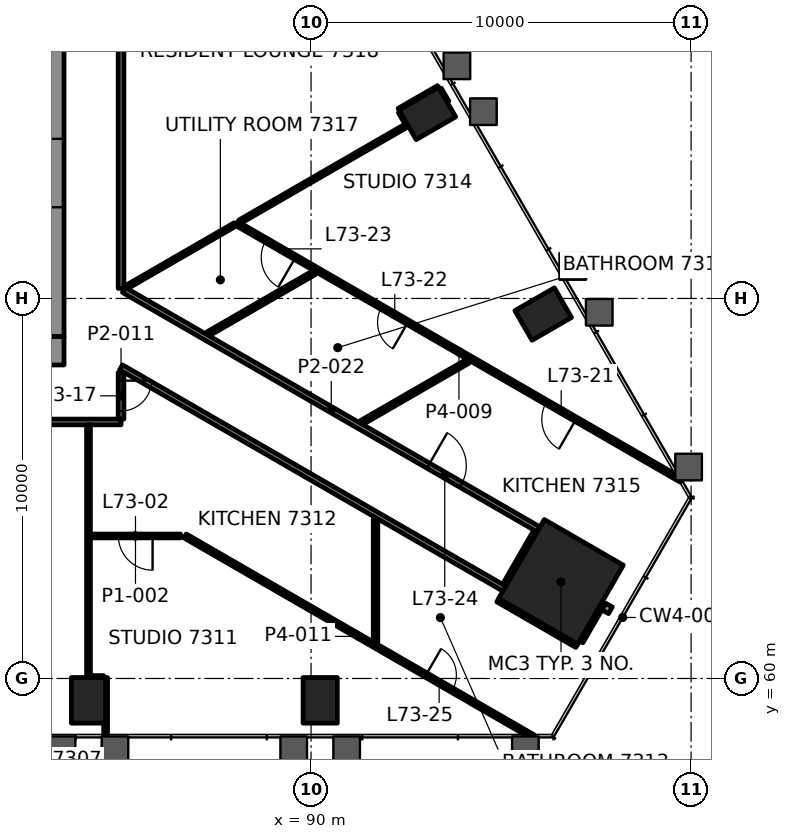
"""IFC4 building model, lengths in metres.
Left out: names, types, materials, properties, quantities, classifications, styles, units other than length and angle.
Written with IfcOpenShell. Run it as: python <this file> out.ifc"""

import sys

from ifc_helpers import new_model, si_unit, direction, frame, frame_2d, origin, origin_2d, place, context, subcontext, project, spatial, rectangle, hollow_rectangle, extrude, element, fill, save


model = new_model("IFC4")
c1 = context("Model", 3, precision=1e-05, world=origin(), true_north=direction((0.0, 1.0)))
c2 = subcontext(c1, "Body", "Model", "MODEL_VIEW")
j1 = project(units=[si_unit("LENGTHUNIT", "METRE"), si_unit("PLANEANGLEUNIT", "RADIAN")], contexts=[c1])
p1 = place(None, origin())
s1 = spatial("IfcSite", under=j1, at=p1, CompositionType="ELEMENT")
p2 = place(p1, origin())
s2 = spatial("IfcBuilding", under=s1, at=p2, CompositionType="ELEMENT")
p3 = place(p2, frame((0.0, 0.0, 302.1)))
s3 = spatial("IfcBuildingStorey", under=s2, at=p3, CompositionType="ELEMENT", Elevation=302.1)
p4 = place(p3, frame((96.577, 62.542, 0.0), z_axis=(0.0, 0.0, 1.0), x_axis=(0.5, 0.866025403784, 0.0)))
e1 = element("IfcColumn", 1, at=p4, inside=s3, PredefinedType="COLUMN", context=c2, shape_type="SweptSolid", body=[
    extrude(rectangle(XDim=2.4, YDim=2.4, at=origin_2d()), origin(), (0.0, 0.0, 1.0), 3.5),
])
for number, where, z_axis, x_axis in (
    (2, (84.144, 59.425, -0.0), (0.0, 0.0, 1.0), (1.0, 0.0, 0.0)),
    (3, (90.24, 59.425, -0.0), (0.0, 0.0, 1.0), (1.0, 0.0, 0.0)),
    (4, (96.109, 69.589, -0.0), (0.0, 0.0, 1.0), (-0.5, 0.866, 0.0)),
    (5, (93.061, 74.869, -0.0), (0.0, 0.0, 1.0), (-0.5, 0.866, 0.0)),
):
    element("IfcColumn", number, at=place(p3, frame(where, z_axis=z_axis, x_axis=x_axis)), inside=s3, PredefinedType="COLUMN", context=c2, shape_type="SweptSolid", body=[
        extrude(hollow_rectangle(XDim=0.9, YDim=1.2, WallThickness=0.06, at=origin_2d()), origin(), (0.0, 0.0, 1.0), 3.5),
    ])
p5 = place(p3, frame((66.5, 68.625, 0.0), z_axis=(0.0, 0.0, 1.0), x_axis=(1.0, 0.0, 0.0)))
e6 = element("IfcWall", 6, at=p5, inside=s3, PredefinedType="SHEAR", context=c2, shape_type="SweptSolid", body=[
    extrude(rectangle(XDim=17.0, YDim=0.75, at=frame_2d((8.5, 0.0))), origin(), (0.0, 0.0, 1.0), 3.3),
])
p6 = place(p5, frame((2.7, 0.0, 0.0)))
e7 = element("IfcOpeningElement", 7, at=p6, cuts=e6, PredefinedType="OPENING", context=c2, shape_type="SweptSolid", body=[
    extrude(rectangle(XDim=0.9, YDim=2.1, at=frame_2d((0.45, 1.05))), frame((0.0, 0.385, 0.0), z_axis=(0.0, -1.0, 0.0), x_axis=(1.0, 0.0, 0.0)), (0.0, 0.0, 1.0), 0.77),
])
p7 = place(p3, frame((83.125, 69.0, 0.0), z_axis=(0.0, 0.0, 1.0), x_axis=(0.0, 1.0, 0.0)))
e8 = element("IfcWall", 8, at=p7, inside=s3, PredefinedType="SHEAR", context=c2, shape_type="SweptSolid", body=[
    extrude(rectangle(XDim=12.0, YDim=0.75, at=frame_2d((6.0, 0.0))), origin(), (0.0, 0.0, 1.0), 3.3),
])
p8 = place(p7, frame((3.4, 0.0, 0.0)))
e9 = element("IfcOpeningElement", 9, at=p8, cuts=e8, PredefinedType="OPENING", context=c2, shape_type="SweptSolid", body=[
    extrude(rectangle(XDim=1.8, YDim=2.1, at=frame_2d((0.9, 1.05))), frame((0.0, 0.385, 0.0), z_axis=(0.0, -1.0, 0.0), x_axis=(1.0, 0.0, 0.0)), (0.0, 0.0, 1.0), 0.77),
])
p9 = place(p3, frame((84.194, 60.025, 0.0), z_axis=(0.0, 0.0, 1.0), x_axis=(1.0, 0.0, 0.0)))
e10 = element("IfcWall", 10, at=p9, inside=s3, PredefinedType="PARTITIONING", context=c2, shape_type="SweptSolid", body=[
    extrude(rectangle(XDim=0.347, YDim=0.1, at=frame_2d((0.173, 0.0))), origin(), (0.0, 0.0, 1.0), 2.7),
])
p10 = place(p3, frame((86.566, 63.75, 0.0), z_axis=(0.0, 0.0, 1.0), x_axis=(-1.0, 0.0, 0.0)))
e11 = element("IfcWall", 11, at=p10, inside=s3, PredefinedType="PARTITIONING", context=c2, shape_type="SweptSolid", body=[
    extrude(rectangle(XDim=2.372, YDim=0.1, at=frame_2d((1.186, 0.0))), origin(), (0.0, 0.0, 1.0), 2.7),
])
p11 = place(p10, frame((0.736, 0.0, 0.0)))
e12 = element("IfcOpeningElement", 12, at=p11, cuts=e11, PredefinedType="OPENING", context=c2, shape_type="SweptSolid", body=[
    extrude(rectangle(XDim=0.9, YDim=2.1, at=frame_2d((0.45, 1.05))), frame((0.0, 0.06, 0.0), z_axis=(0.0, -1.0, 0.0), x_axis=(1.0, 0.0, 0.0)), (0.0, 0.0, 1.0), 0.12),
])
p12 = place(p3, frame((85.0, 66.75, 0.0), z_axis=(0.0, 0.0, 1.0), x_axis=(-1.0, 0.0, 0.0)))
e13 = element("IfcWall", 13, at=p12, inside=s3, PredefinedType="PARTITIONING", context=c2, shape_type="SweptSolid", body=[
    extrude(rectangle(XDim=20.0, YDim=0.15, at=frame_2d((10.0, 0.0))), origin(), (0.0, 0.0, 1.0), 2.7),
])
p13 = place(p12, frame((5.486, 0.0, 0.0)))
e14 = element("IfcOpeningElement", 14, at=p13, cuts=e13, PredefinedType="OPENING", context=c2, shape_type="SweptSolid", body=[
    extrude(rectangle(XDim=0.9, YDim=2.1, at=frame_2d((0.45, 1.05))), frame((0.0, 0.085, 0.0), z_axis=(0.0, -1.0, 0.0), x_axis=(1.0, 0.0, 0.0)), (0.0, 0.0, 1.0), 0.17),
])
p14 = place(p12, frame((11.582, 0.0, 0.0)))
e15 = element("IfcOpeningElement", 15, at=p14, cuts=e13, PredefinedType="OPENING", context=c2, shape_type="SweptSolid", body=[
    extrude(rectangle(XDim=0.9, YDim=2.1, at=frame_2d((0.45, 1.05))), frame((0.0, 0.085, 0.0), z_axis=(0.0, -1.0, 0.0), x_axis=(1.0, 0.0, 0.0)), (0.0, 0.0, 1.0), 0.17),
])
p15 = place(p12, frame((13.614, 0.0, 0.0)))
e16 = element("IfcOpeningElement", 16, at=p15, cuts=e13, PredefinedType="OPENING", context=c2, shape_type="SweptSolid", body=[
    extrude(rectangle(XDim=0.9, YDim=2.1, at=frame_2d((0.45, 1.05))), frame((0.0, 0.085, 0.0), z_axis=(0.0, -1.0, 0.0), x_axis=(1.0, 0.0, 0.0)), (0.0, 0.0, 1.0), 0.17),
])
p16 = place(p12, frame((15.646, 0.0, 0.0)))
e17 = element("IfcOpeningElement", 17, at=p16, cuts=e13, PredefinedType="OPENING", context=c2, shape_type="SweptSolid", body=[
    extrude(rectangle(XDim=0.9, YDim=2.1, at=frame_2d((0.45, 1.05))), frame((0.0, 0.085, 0.0), z_axis=(0.0, -1.0, 0.0), x_axis=(1.0, 0.0, 0.0)), (0.0, 0.0, 1.0), 0.17),
])
p17 = place(p12, frame((17.678, 0.0, 0.0)))
e18 = element("IfcOpeningElement", 18, at=p17, cuts=e13, PredefinedType="OPENING", context=c2, shape_type="SweptSolid", body=[
    extrude(rectangle(XDim=0.9, YDim=2.1, at=frame_2d((0.45, 1.05))), frame((0.0, 0.085, 0.0), z_axis=(0.0, -1.0, 0.0), x_axis=(1.0, 0.0, 0.0)), (0.0, 0.0, 1.0), 0.17),
])
for number, where, z_axis, x_axis in (
    (19, (91.333, 66.736, 0.0), (0.0, 0.0, 1.0), (0.866, 0.5, 0.0)),
    (20, (87.292, 69.069, 0.0), (0.0, 0.0, 1.0), (0.866, 0.5, 0.0)),
):
    element("IfcWall", number, at=place(p3, frame(where, z_axis=z_axis, x_axis=x_axis)), inside=s3, PredefinedType="PARTITIONING", context=c2, shape_type="SweptSolid", body=[
        extrude(rectangle(XDim=3.228, YDim=0.12, at=frame_2d((1.614, 0.0))), origin(), (0.0, 0.0, 1.0), 2.7),
    ])
p18 = place(p3, frame((85.145, 70.299, 0.0), z_axis=(0.0, 0.0, 1.0), x_axis=(0.866032610133, 0.499987518031, 0.0)))
e21 = element("IfcWall", 21, at=p18, inside=s3, PredefinedType="PARTITIONING", context=c2, shape_type="SweptSolid", body=[
    extrude(rectangle(XDim=3.295, YDim=0.1, at=frame_2d((1.648, 0.0))), origin(), (0.0, 0.0, 1.0), 2.7),
])
p19 = place(p3, frame((92.318, 74.959, 0.0), z_axis=(0.0, 0.0, 1.0), x_axis=(0.866087020037, 0.499893262331, 0.0)))
e22 = element("IfcWall", 22, at=p19, inside=s3, PredefinedType="PARTITIONING", context=c2, shape_type="SweptSolid", body=[
    extrude(rectangle(XDim=1.196, YDim=0.1, at=frame_2d((0.598, 0.0))), origin(), (0.0, 0.0, 1.0), 2.688),
])
p20 = place(p3, frame((97.067, 60.99, 0.0), z_axis=(0.0, 0.0, 1.0), x_axis=(0.499818604933, 0.866130106949, 0.0)))
e23 = element("IfcWall", 23, at=p20, inside=s3, PredefinedType="PARTITIONING", context=c2, shape_type="SweptSolid", body=[
    extrude(rectangle(XDim=1.099, YDim=0.2, at=frame_2d((0.55, 0.0))), origin(), (0.0, 0.0, 1.0), 2.7),
])
p21 = place(p3, frame((95.128, 62.433, 0.0), z_axis=(0.0, 0.0, 1.0), x_axis=(0.500052415518, 0.865995139556, 0.0)))
e24 = element("IfcWall", 24, at=p21, inside=s3, PredefinedType="PARTITIONING", context=c2, shape_type="SweptSolid", body=[
    extrude(rectangle(XDim=1.644, YDim=0.2, at=frame_2d((0.822, 0.0))), origin(), (0.0, 0.0, 1.0), 2.547),
])
p22 = place(p3, frame((91.697, 60.966, 0.0), z_axis=(0.0, 0.0, 1.0), x_axis=(0.0, 1.0, 0.0)))
e25 = element("IfcWall", 25, at=p22, inside=s3, PredefinedType="PARTITIONING", context=c2, shape_type="SweptSolid", body=[
    extrude(rectangle(XDim=3.228, YDim=0.12, at=frame_2d((1.614, 0.0))), origin(), (0.0, 0.0, 1.0), 2.7),
])
p23 = place(p3, frame((85.0, 68.051, 0.0), z_axis=(0.0, 0.0, 1.0), x_axis=(0.0, -1.0, 0.0)))
e26 = element("IfcWall", 26, at=p23, inside=s3, PredefinedType="PARTITIONING", context=c2, shape_type="SweptSolid", body=[
    extrude(rectangle(XDim=1.226, YDim=0.15, at=frame_2d((0.613, 0.0))), origin(), (0.0, 0.0, 1.0), 2.547),
])
p24 = place(p23, frame((0.213, 0.0, 0.0)))
e27 = element("IfcOpeningElement", 27, at=p24, cuts=e26, PredefinedType="OPENING", context=c2, shape_type="SweptSolid", body=[
    extrude(rectangle(XDim=0.8, YDim=2.1, at=frame_2d((0.4, 1.05))), frame((0.0, 0.085, 0.0), z_axis=(0.0, -1.0, 0.0), x_axis=(1.0, 0.0, 0.0)), (0.0, 0.0, 1.0), 0.17),
])
p25 = place(p3, frame((85.0, 70.266, 0.0), z_axis=(0.0, 0.0, 1.0), x_axis=(0.0, 1.0, 0.0)))
e28 = element("IfcWall", 28, at=p25, inside=s3, PredefinedType="PARTITIONING", context=c2, shape_type="SweptSolid", body=[
    extrude(rectangle(XDim=12.982, YDim=0.15, at=frame_2d((6.491, 0.0))), origin(), (0.0, 0.0, 1.0), 2.7),
])
p26 = place(p3, frame((84.594, 58.465, 0.0), z_axis=(0.0, 0.0, 1.0), x_axis=(0.0, 1.0, 0.0)))
e29 = element("IfcWall", 29, at=p26, inside=s3, PredefinedType="PARTITIONING", context=c2, shape_type="SweptSolid", body=[
    extrude(rectangle(XDim=1.557, YDim=0.1, at=frame_2d((0.778, 0.0))), origin(), (0.0, 0.0, 1.0), 2.7),
])
p27 = place(p3, frame((84.144, 60.025, 0.0), z_axis=(0.0, 0.0, 1.0), x_axis=(0.0, 1.0, 0.0)))
e30 = element("IfcWall", 30, at=p27, inside=s3, PredefinedType="PARTITIONING", context=c2, shape_type="SweptSolid", body=[
    extrude(rectangle(XDim=6.65, YDim=0.1, at=frame_2d((3.325, 0.0))), origin(), (0.0, 0.0, 1.0), 2.7),
])
p28 = place(p3, frame((93.58, 75.169, 0.0), z_axis=(0.0, 0.0, 1.0), x_axis=(-0.500153222552, 0.865936922628, 0.0)))
e31 = element("IfcWall", 31, at=p28, inside=s3, PredefinedType="PARTITIONING", context=c2, shape_type="SweptSolid", body=[
    extrude(rectangle(XDim=0.393, YDim=0.1, at=frame_2d((0.196, 0.0))), origin(), (0.0, 0.0, 1.0), 2.7),
])
p29 = place(p3, frame((92.511, 74.621, 0.0), z_axis=(0.0, 0.0, 1.0), x_axis=(-0.499868360126, 0.866101392762, 0.0)))
e32 = element("IfcWall", 32, at=p29, inside=s3, PredefinedType="PARTITIONING", context=c2, shape_type="SweptSolid", body=[
    extrude(rectangle(XDim=0.338, YDim=0.1, at=frame_2d((0.169, 0.0))), origin(), (0.0, 0.0, 1.0), 2.7),
])
p30 = place(p3, frame((99.74, 65.22, 0.0), z_axis=(0.0, 0.0, 1.0), x_axis=(-0.866029646425, 0.499992651459, 0.0)))
e33 = element("IfcWall", 33, at=p30, inside=s3, PredefinedType="PARTITIONING", context=c2, shape_type="SweptSolid", body=[
    extrude(rectangle(XDim=13.505, YDim=0.12, at=frame_2d((6.752, 0.0))), origin(), (0.0, 0.0, 1.0), 2.7),
])
p31 = place(p30, frame((3.197, 0.0, 0.0)))
e34 = element("IfcOpeningElement", 34, at=p31, cuts=e33, PredefinedType="OPENING", context=c2, shape_type="SweptSolid", body=[
    extrude(rectangle(XDim=0.9, YDim=2.1, at=frame_2d((0.45, 1.05))), frame((0.0, 0.07, 0.0), z_axis=(0.0, -1.0, 0.0), x_axis=(1.0, 0.0, 0.0)), (0.0, 0.0, 1.0), 0.14),
])
p32 = place(p30, frame((8.303, 0.0, 0.0)))
e35 = element("IfcOpeningElement", 35, at=p32, cuts=e33, PredefinedType="OPENING", context=c2, shape_type="SweptSolid", body=[
    extrude(rectangle(XDim=0.8, YDim=2.1, at=frame_2d((0.4, 1.05))), frame((0.0, 0.07, 0.0), z_axis=(0.0, -1.0, 0.0), x_axis=(1.0, 0.0, 0.0)), (0.0, 0.0, 1.0), 0.14),
])
p33 = place(p30, frame((11.721, 0.0, 0.0)))
e36 = element("IfcOpeningElement", 36, at=p33, cuts=e33, PredefinedType="OPENING", context=c2, shape_type="SweptSolid", body=[
    extrude(rectangle(XDim=0.9, YDim=2.1, at=frame_2d((0.45, 1.05))), frame((0.0, 0.07, 0.0), z_axis=(0.0, -1.0, 0.0), x_axis=(1.0, 0.0, 0.0)), (0.0, 0.0, 1.0), 0.14),
])
p34 = place(p3, frame((85.075, 70.222, 0.0), z_axis=(0.0, 0.0, 1.0), x_axis=(0.866023935413, -0.500002543286, 0.0)))
e37 = element("IfcWall", 37, at=p34, inside=s3, PredefinedType="PARTITIONING", context=c2, shape_type="SweptSolid", body=[
    extrude(rectangle(XDim=12.601, YDim=0.15, at=frame_2d((6.3, 0.0))), origin(), (0.0, 0.0, 1.0), 2.7),
])
p35 = place(p34, frame((9.249, 0.0, 0.0)))
e38 = element("IfcOpeningElement", 38, at=p35, cuts=e37, PredefinedType="OPENING", context=c2, shape_type="SweptSolid", body=[
    extrude(rectangle(XDim=1.0, YDim=2.1, at=frame_2d((0.5, 1.05))), frame((0.0, 0.085, 0.0), z_axis=(0.0, -1.0, 0.0), x_axis=(1.0, 0.0, 0.0)), (0.0, 0.0, 1.0), 0.17),
])
p36 = place(p3, frame((97.876, 61.792, 0.0), z_axis=(0.0, 0.0, 1.0), x_axis=(-0.865900389786, 0.500216468111, 0.0)))
e39 = element("IfcWall", 39, at=p36, inside=s3, PredefinedType="PARTITIONING", context=c2, shape_type="SweptSolid", body=[
    extrude(rectangle(XDim=0.2, YDim=0.2, at=frame_2d((0.1, 0.0))), origin(), (0.0, 0.0, 1.0), 2.7),
])
p37 = place(p3, frame((95.088, 62.363, 0.0), z_axis=(0.0, 0.0, 1.0), x_axis=(-0.866026430432, 0.49999822179, 0.0)))
e40 = element("IfcWall", 40, at=p37, inside=s3, PredefinedType="PARTITIONING", context=c2, shape_type="SweptSolid", body=[
    extrude(rectangle(XDim=11.648, YDim=0.15, at=frame_2d((5.824, 0.0))), origin(), (0.0, 0.0, 1.0), 2.547),
])
p38 = place(p3, frame((97.016, 60.904, 0.0), z_axis=(0.0, 0.0, 1.0), x_axis=(-0.866036455013, 0.499980858223, 0.0)))
e41 = element("IfcWall", 41, at=p38, inside=s3, PredefinedType="PARTITIONING", context=c2, shape_type="SweptSolid", body=[
    extrude(rectangle(XDim=2.399, YDim=0.2, at=frame_2d((1.199, 0.0))), origin(), (0.0, 0.0, 1.0), 2.7),
])
p39 = place(p3, frame((86.686, 63.75, 0.0), z_axis=(0.0, 0.0, 1.0), x_axis=(0.866034434898, -0.499984357326, 0.0)))
e42 = element("IfcWall", 42, at=p39, inside=s3, PredefinedType="PARTITIONING", context=c2, shape_type="SweptSolid", body=[
    extrude(rectangle(XDim=10.571, YDim=0.12, at=frame_2d((5.285, 0.0))), origin(), (0.0, 0.0, 1.0), 2.7),
])
p40 = place(p39, frame((7.318, 0.0, 0.0)))
e43 = element("IfcOpeningElement", 43, at=p40, cuts=e42, PredefinedType="OPENING", context=c2, shape_type="SweptSolid", body=[
    extrude(rectangle(XDim=0.8, YDim=2.1, at=frame_2d((0.4, 1.05))), frame((0.0, 0.07, 0.0), z_axis=(0.0, -1.0, 0.0), x_axis=(1.0, 0.0, 0.0)), (0.0, 0.0, 1.0), 0.14),
])
p41 = place(p3, frame((88.129, 72.021, 0.0), z_axis=(0.0, 0.0, 1.0), x_axis=(0.866010809447, 0.500025277282, 0.0)))
e44 = element("IfcWall", 44, at=p41, inside=s3, PredefinedType="PARTITIONING", context=c2, shape_type="SweptSolid", body=[
    extrude(rectangle(XDim=5.094, YDim=0.1, at=frame_2d((2.547, 0.0))), origin(), (0.0, 0.0, 1.0), 2.7),
])
p42 = place(p11, origin())
e45 = element("IfcDoor", 45, at=p42, inside=s3, OperationType="SINGLE_SWING_LEFT", PredefinedType="DOOR", context=c2, shape_type="SweptSolid", body=[
    extrude(rectangle(XDim=0.9, YDim=2.1, at=frame_2d((0.45, 1.05))), frame((0.0, 0.025, 0.0), z_axis=(0.0, -1.0, 0.0), x_axis=(1.0, 0.0, 0.0)), (0.0, 0.0, 1.0), 0.05),
])
fill(e12, e45)
p43 = place(p24, origin())
e46 = element("IfcDoor", 46, at=p43, inside=s3, OperationType="SINGLE_SWING_RIGHT", PredefinedType="DOOR", context=c2, shape_type="SweptSolid", body=[
    extrude(rectangle(XDim=0.8, YDim=2.1, at=frame_2d((0.4, 1.05))), frame((0.0, 0.025, 0.0), z_axis=(0.0, -1.0, 0.0), x_axis=(1.0, 0.0, 0.0)), (0.0, 0.0, 1.0), 0.05),
])
fill(e27, e46)
p44 = place(p31, origin())
e47 = element("IfcDoor", 47, at=p44, inside=s3, OperationType="SINGLE_SWING_RIGHT", PredefinedType="DOOR", context=c2, shape_type="SweptSolid", body=[
    extrude(rectangle(XDim=0.9, YDim=2.1, at=frame_2d((0.45, 1.05))), frame((0.0, 0.025, 0.0), z_axis=(0.0, -1.0, 0.0), x_axis=(1.0, 0.0, 0.0)), (0.0, 0.0, 1.0), 0.05),
])
fill(e34, e47)
p45 = place(p32, origin())
e48 = element("IfcDoor", 48, at=p45, inside=s3, OperationType="SINGLE_SWING_RIGHT", PredefinedType="DOOR", context=c2, shape_type="SweptSolid", body=[
    extrude(rectangle(XDim=0.8, YDim=2.1, at=frame_2d((0.4, 1.05))), frame((0.0, 0.025, 0.0), z_axis=(0.0, -1.0, 0.0), x_axis=(1.0, 0.0, 0.0)), (0.0, 0.0, 1.0), 0.05),
])
fill(e35, e48)
p46 = place(p33, origin())
e49 = element("IfcDoor", 49, at=p46, inside=s3, OperationType="SINGLE_SWING_LEFT", PredefinedType="DOOR", context=c2, shape_type="SweptSolid", body=[
    extrude(rectangle(XDim=0.9, YDim=2.1, at=frame_2d((0.45, 1.05))), frame((0.0, 0.025, 0.0), z_axis=(0.0, -1.0, 0.0), x_axis=(1.0, 0.0, 0.0)), (0.0, 0.0, 1.0), 0.05),
])
fill(e36, e49)
p47 = place(p35, origin())
e50 = element("IfcDoor", 50, at=p47, inside=s3, OperationType="SINGLE_SWING_RIGHT", PredefinedType="DOOR", context=c2, shape_type="SweptSolid", body=[
    extrude(rectangle(XDim=1.0, YDim=2.1, at=frame_2d((0.5, 1.05))), frame((0.0, 0.025, 0.0), z_axis=(0.0, -1.0, 0.0), x_axis=(1.0, 0.0, 0.0)), (0.0, 0.0, 1.0), 0.05),
])
fill(e38, e50)
p48 = place(p40, origin())
e51 = element("IfcDoor", 51, at=p48, inside=s3, OperationType="SINGLE_SWING_LEFT", PredefinedType="DOOR", context=c2, shape_type="SweptSolid", body=[
    extrude(rectangle(XDim=0.8, YDim=2.1, at=frame_2d((0.4, 1.05))), frame((0.0, 0.025, 0.0), z_axis=(0.0, -1.0, 0.0), x_axis=(1.0, 0.0, 0.0)), (0.0, 0.0, 1.0), 0.05),
])
fill(e43, e51)
p49 = place(p8, origin())
e52 = element("IfcDoor", 52, at=p49, inside=s3, OperationType="SINGLE_SWING_LEFT", PredefinedType="DOOR", context=c2, shape_type="SweptSolid", body=[
    extrude(rectangle(XDim=1.8, YDim=2.1, at=frame_2d((0.9, 1.05))), frame((0.0, 0.095, 0.0), z_axis=(0.0, -1.0, 0.0), x_axis=(1.0, 0.0, 0.0)), (0.0, 0.0, 1.0), 0.19),
])
fill(e9, e52)
save(model, sys.argv[1])
